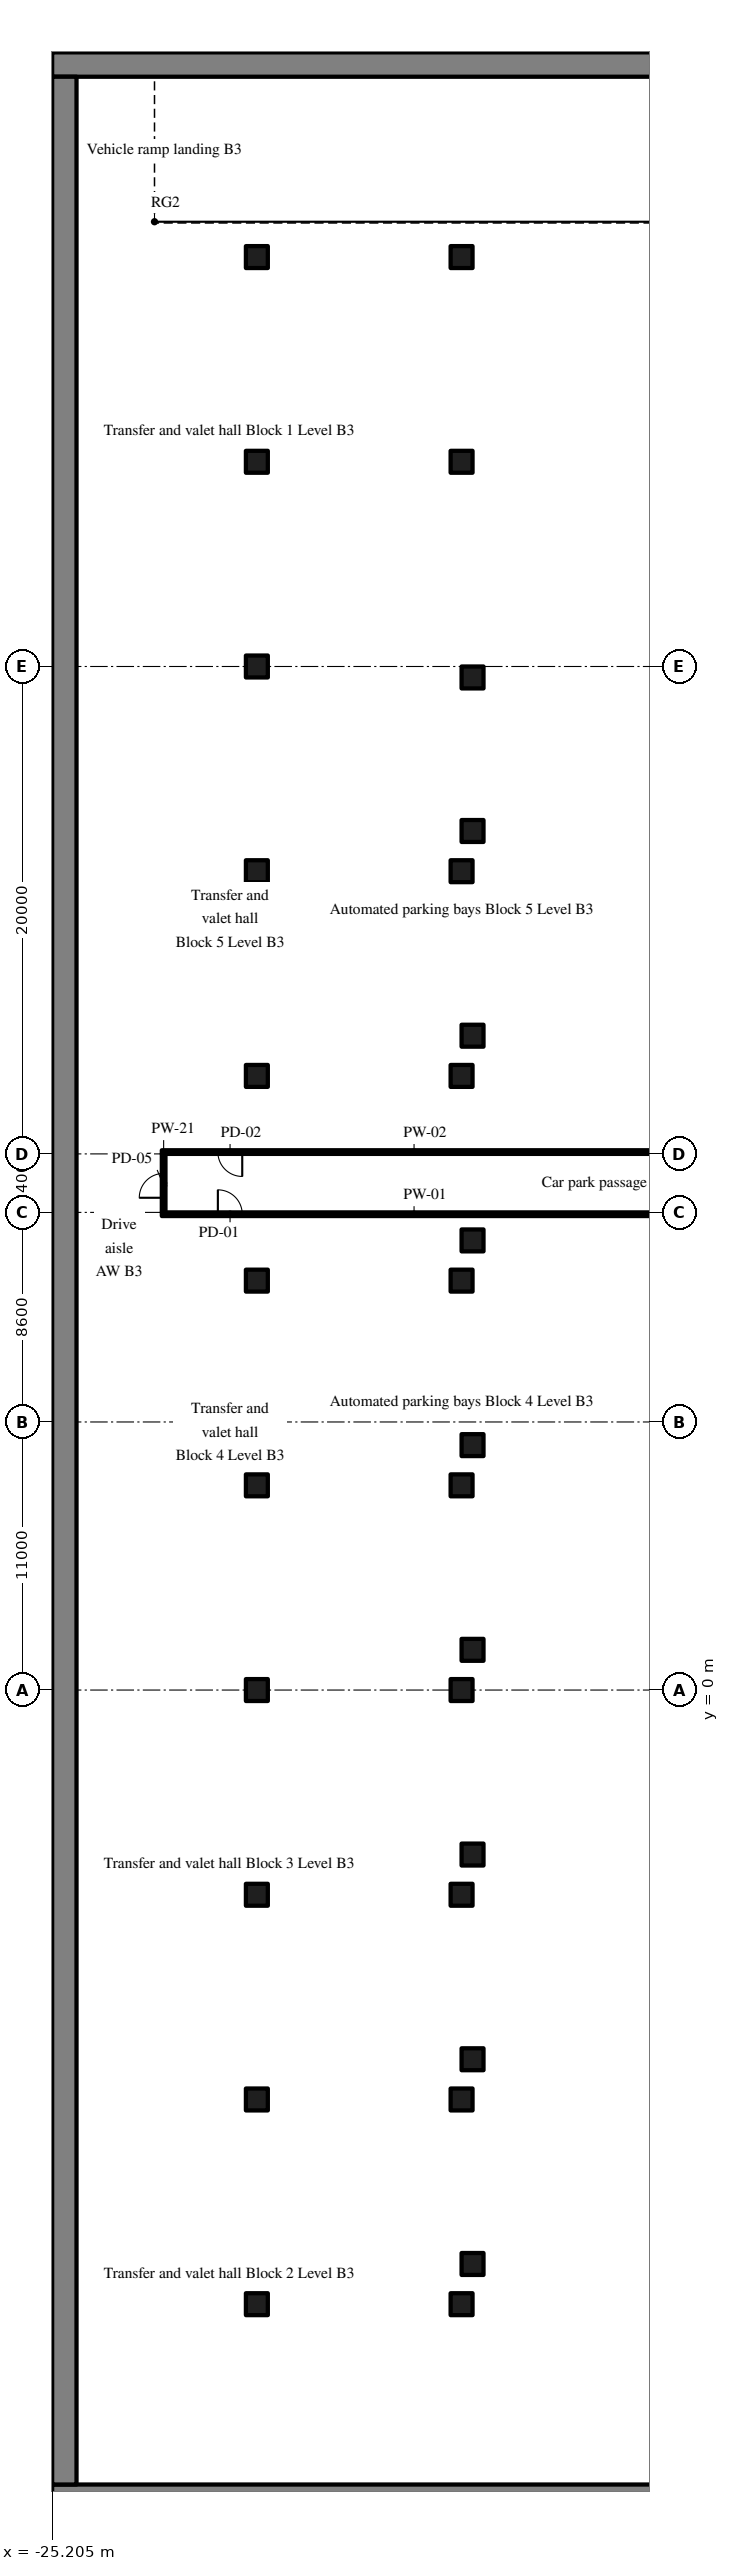
"""IFC4 building model, lengths in metres.
Left out: names, types, materials, properties, quantities, classifications, styles, units other than length and angle.
Written with IfcOpenShell. Run it as: python <this file> out.ifc"""

import sys

from ifc_helpers import new_model, si_unit, direction, frame, frame_2d, origin, origin_2d, place, context, subcontext, project, spatial, rectangle, extrude, source, transform, mapped, element, fill, save


model = new_model("IFC4")
c1 = context("Model", 3, precision=1e-05, world=origin(), true_north=direction((0.0, 1.0)))
c2 = subcontext(c1, "Body", "Model", "MODEL_VIEW")
j1 = project(units=[si_unit("LENGTHUNIT", "METRE"), si_unit("PLANEANGLEUNIT", "RADIAN")], contexts=[c1])
p1 = place(None, origin())
s1 = spatial("IfcSite", under=j1, at=p1, CompositionType="ELEMENT")
p2 = place(p1, origin())
s2 = spatial("IfcBuilding", under=s1, at=p2, CompositionType="ELEMENT")
p3 = place(p2, frame((0.0, 0.0, -13.5)))
s3 = spatial("IfcBuildingStorey", under=s2, at=p3, CompositionType="ELEMENT", Elevation=-13.5)
m1 = source(origin(), c2, "Body", "SweptSolid", [
    extrude(rectangle(XDim=151.2, YDim=1.0, at=frame_2d((75.6, 0.0))), origin(), (0.0, 0.0, 1.0), 4.52),
])
for number, where, z_axis, x_axis in (
    (1, (-25.2, -33.1, -0.3), (0.0, 0.0, 1.0), (1.0, 0.0, 0.0)),
    (2, (-25.2, 66.7, -0.3), (0.0, 0.0, 1.0), (1.0, 0.0, 0.0)),
):
    element("IfcWall", number, at=place(p3, frame(where, z_axis=z_axis, x_axis=x_axis)), inside=s3, PredefinedType="SHEAR", context=c2, shape_type="MappedRepresentation", body=[
        mapped(m1, transform((0.0, 0.0, 0.0), scale=1.0)),
    ])
m2 = source(origin(), c2, "Body", "SweptSolid", [
    extrude(rectangle(XDim=98.8, YDim=1.0, at=frame_2d((49.4, 0.0))), origin(), (0.0, 0.0, 1.0), 4.52),
])
p4 = place(p3, frame((-24.7, -32.6, -0.3), z_axis=(0.0, 0.0, 1.0), x_axis=(0.0, 1.0, 0.0)))
e3 = element("IfcWall", 3, at=p4, inside=s3, PredefinedType="SHEAR", context=c2, shape_type="MappedRepresentation", body=[
    mapped(m2, transform((0.0, 0.0, 0.0), scale=1.0)),
])
m3 = source(origin(), c2, "Body", "SweptSolid", [
    extrude(rectangle(XDim=0.9, YDim=0.9, at=origin_2d()), origin(), (0.0, 0.0, 1.0), 4.52),
])
for number, where, z_axis, x_axis in (
    (4, (-7.95, -23.55, -0.3), (0.0, 0.0, 1.0), (1.0, 0.0, 0.0)),
    (5, (-7.95, -15.15, -0.3), (0.0, 0.0, 1.0), (1.0, 0.0, 0.0)),
    (6, (-7.95, -6.75, -0.3), (0.0, 0.0, 1.0), (1.0, 0.0, 0.0)),
    (7, (-7.95, 1.65, -0.3), (0.0, 0.0, 1.0), (1.0, 0.0, 0.0)),
    (8, (-7.95, 10.05, -0.3), (0.0, 0.0, 1.0), (1.0, 0.0, 0.0)),
    (9, (-7.95, 18.45, -0.3), (0.0, 0.0, 1.0), (1.0, 0.0, 0.0)),
    (10, (-7.95, 26.85, -0.3), (0.0, 0.0, 1.0), (1.0, 0.0, 0.0)),
    (11, (-7.95, 35.25, -0.3), (0.0, 0.0, 1.0), (1.0, 0.0, 0.0)),
    (12, (-7.95, 41.55, -0.3), (0.0, 0.0, 1.0), (1.0, 0.0, 0.0)),
    (13, (-16.8, -25.2, -0.3), (0.0, 0.0, 1.0), (1.0, 0.0, 0.0)),
    (14, (-16.8, -16.8, -0.3), (0.0, 0.0, 1.0), (1.0, 0.0, 0.0)),
    (15, (-16.8, -8.4, -0.3), (0.0, 0.0, 1.0), (1.0, 0.0, 0.0)),
    (16, (-16.8, 0.0, -0.3), (0.0, 0.0, 1.0), (1.0, 0.0, 0.0)),
    (17, (-16.8, 8.4, -0.3), (0.0, 0.0, 1.0), (1.0, 0.0, 0.0)),
    (18, (-16.8, 16.8, -0.3), (0.0, 0.0, 1.0), (1.0, 0.0, 0.0)),
    (19, (-16.8, 25.2, -0.3), (0.0, 0.0, 1.0), (1.0, 0.0, 0.0)),
    (20, (-16.8, 33.6, -0.3), (0.0, 0.0, 1.0), (1.0, 0.0, 0.0)),
    (21, (-16.8, 42.0, -0.3), (0.0, 0.0, 1.0), (1.0, 0.0, 0.0)),
    (22, (-16.8, 50.4, -0.3), (0.0, 0.0, 1.0), (1.0, 0.0, 0.0)),
    (23, (-16.8, 58.8, -0.3), (0.0, 0.0, 1.0), (1.0, 0.0, 0.0)),
    (24, (-8.4, -25.2, -0.3), (0.0, 0.0, 1.0), (1.0, 0.0, 0.0)),
    (25, (-8.4, -16.8, -0.3), (0.0, 0.0, 1.0), (1.0, 0.0, 0.0)),
    (26, (-8.4, -8.4, -0.3), (0.0, 0.0, 1.0), (1.0, 0.0, 0.0)),
    (27, (-8.4, 0.0, -0.3), (0.0, 0.0, 1.0), (1.0, 0.0, 0.0)),
    (28, (-8.4, 8.4, -0.3), (0.0, 0.0, 1.0), (1.0, 0.0, 0.0)),
    (29, (-8.4, 16.8, -0.3), (0.0, 0.0, 1.0), (1.0, 0.0, 0.0)),
    (30, (-8.4, 25.2, -0.3), (0.0, 0.0, 1.0), (1.0, 0.0, 0.0)),
    (31, (-8.4, 33.6, -0.3), (0.0, 0.0, 1.0), (1.0, 0.0, 0.0)),
    (32, (-8.4, 50.4, -0.3), (0.0, 0.0, 1.0), (1.0, 0.0, 0.0)),
    (33, (-8.4, 58.8, -0.3), (0.0, 0.0, 1.0), (1.0, 0.0, 0.0)),
):
    element("IfcColumn", number, at=place(p3, frame(where, z_axis=z_axis, x_axis=x_axis)), inside=s3, PredefinedType="COLUMN", context=c2, shape_type="MappedRepresentation", body=[
        mapped(m3, transform((0.0, 0.0, 0.0), scale=1.0)),
    ])
m4 = source(origin(), c2, "Body", "SweptSolid", [
    extrude(rectangle(XDim=20.7, YDim=0.15, at=frame_2d((10.35, 0.0))), origin(), (0.0, 0.0, 1.0), 4.22),
])
p5 = place(p3, frame((-20.7, 19.525, 0.0), z_axis=(0.0, 0.0, 1.0), x_axis=(1.0, 0.0, 0.0)))
e34 = element("IfcWall", 34, at=p5, inside=s3, PredefinedType="PARTITIONING", context=c2, shape_type="MappedRepresentation", body=[
    mapped(m4, transform((0.0, 0.0, 0.0), scale=1.0)),
])
m5 = source(origin(), c2, "Body", "SweptSolid", [
    extrude(rectangle(XDim=1.0, YDim=2.1, at=frame_2d((0.5, 1.05))), frame((0.0, 0.085, 0.0), z_axis=(0.0, -1.0, 0.0), x_axis=(1.0, 0.0, 0.0)), (0.0, 0.0, 1.0), 0.17),
])
p6 = place(p5, frame((2.3, 0.0, 0.0)))
e35 = element("IfcOpeningElement", 35, at=p6, cuts=e34, PredefinedType="OPENING", context=c2, shape_type="MappedRepresentation", body=[
    mapped(m5, transform((0.0, 0.0, 0.0), scale=1.0)),
])
p7 = place(p3, frame((-20.7, 22.075, 0.0), z_axis=(0.0, 0.0, 1.0), x_axis=(1.0, 0.0, 0.0)))
e36 = element("IfcWall", 36, at=p7, inside=s3, PredefinedType="PARTITIONING", context=c2, shape_type="MappedRepresentation", body=[
    mapped(m4, transform((0.0, 0.0, 0.0), scale=1.0)),
])
p8 = place(p7, frame((2.3, 0.0, 0.0)))
e37 = element("IfcOpeningElement", 37, at=p8, cuts=e36, PredefinedType="OPENING", context=c2, shape_type="MappedRepresentation", body=[
    mapped(m5, transform((0.0, 0.0, 0.0), scale=1.0)),
])
m6 = source(origin(), c2, "Body", "SweptSolid", [
    extrude(rectangle(XDim=2.4, YDim=0.15, at=frame_2d((1.2, 0.0))), origin(), (0.0, 0.0, 1.0), 4.22),
])
p9 = place(p3, frame((-20.625, 19.6, 0.0), z_axis=(0.0, 0.0, 1.0), x_axis=(0.0, 1.0, 0.0)))
e38 = element("IfcWall", 38, at=p9, inside=s3, PredefinedType="PARTITIONING", context=c2, shape_type="MappedRepresentation", body=[
    mapped(m6, transform((0.0, 0.0, 0.0), scale=1.0)),
])
p10 = place(p9, frame((0.6, 0.0, 0.0)))
e39 = element("IfcOpeningElement", 39, at=p10, cuts=e38, PredefinedType="OPENING", context=c2, shape_type="MappedRepresentation", body=[
    mapped(m5, transform((0.0, 0.0, 0.0), scale=1.0)),
])
m7 = source(origin(), c2, "Body", "SweptSolid", [
    extrude(rectangle(XDim=1.0, YDim=2.1, at=frame_2d((0.5, 1.05))), frame((0.0, 0.025, 0.0), z_axis=(0.0, -1.0, 0.0), x_axis=(1.0, 0.0, 0.0)), (0.0, 0.0, 1.0), 0.05),
])
p11 = place(p6, origin())
e40 = element("IfcDoor", 40, at=p11, inside=s3, OperationType="SINGLE_SWING_LEFT", PredefinedType="DOOR", context=c2, shape_type="MappedRepresentation", body=[
    mapped(m7, transform((0.0, 0.0, 0.0), scale=1.0)),
])
fill(e35, e40)
p12 = place(p8, origin())
e41 = element("IfcDoor", 41, at=p12, inside=s3, OperationType="SINGLE_SWING_RIGHT", PredefinedType="DOOR", context=c2, shape_type="MappedRepresentation", body=[
    mapped(m7, transform((0.0, 0.0, 0.0), scale=1.0)),
])
fill(e37, e41)
p13 = place(p10, origin())
e42 = element("IfcDoor", 42, at=p13, inside=s3, OperationType="SINGLE_SWING_LEFT", PredefinedType="DOOR", context=c2, shape_type="MappedRepresentation", body=[
    mapped(m7, transform((0.0, 0.0, 0.0), scale=1.0)),
])
fill(e39, e42)
save(model, sys.argv[1])
